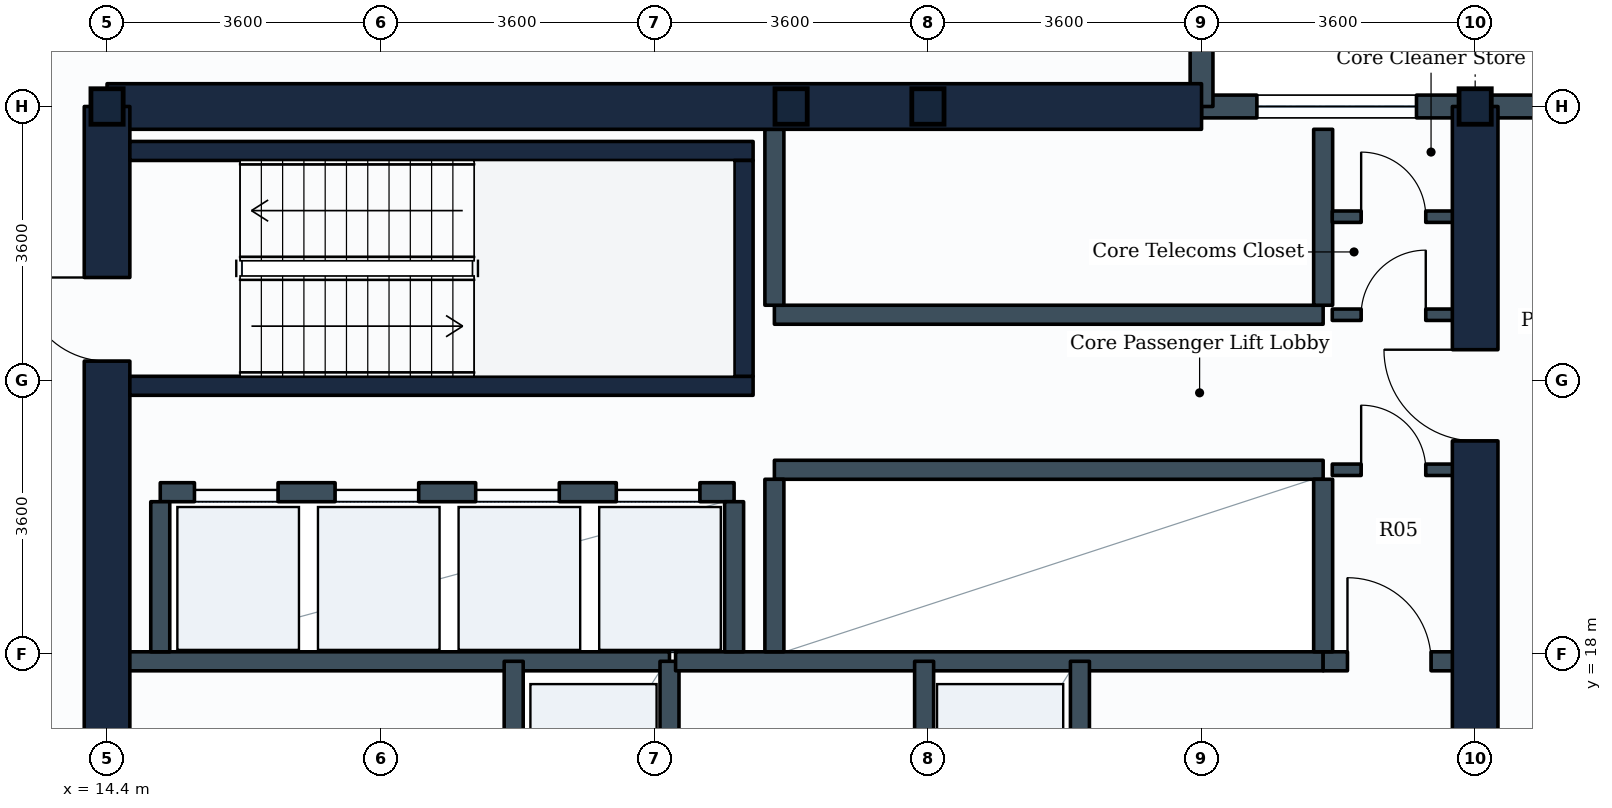
"""IFC4 building model, lengths in metres.
Left out: names, types, materials, properties, quantities, classifications, styles, units other than length and angle.
Written with IfcOpenShell. Run it as: python <this file> out.ifc"""

import sys

from ifc_helpers import new_model, si_unit, direction, frame, frame_2d, origin, origin_2d, place, context, subcontext, project, spatial, rectangle, i_section, extrude, element, fill, save


model = new_model("IFC4")
c1 = context("Model", 3, precision=1e-05, world=origin(), true_north=direction((0.0, 1.0)))
c2 = subcontext(c1, "Body", "Model", "MODEL_VIEW")
j1 = project(units=[si_unit("LENGTHUNIT", "METRE"), si_unit("PLANEANGLEUNIT", "RADIAN")], contexts=[c1])
p1 = place(None, origin())
s1 = spatial("IfcSite", under=j1, at=p1, CompositionType="ELEMENT")
p2 = place(p1, origin())
s2 = spatial("IfcBuilding", under=s1, at=p2, CompositionType="ELEMENT")
p3 = place(p2, frame((0.0, 0.0, 51.3)))
s3 = spatial("IfcBuildingStorey", under=s2, at=p3, CompositionType="ELEMENT", Elevation=51.3)
for number, where, z_axis, x_axis in (
    (1, (14.4, 25.2, 0.0), (0.0, 0.0, 1.0), (1.0, 0.0, 0.0)),
    (2, (23.4, 25.2, 0.0), (0.0, 0.0, 1.0), (1.0, 0.0, 0.0)),
    (3, (25.2, 25.2, 0.0), (0.0, 0.0, 1.0), (1.0, 0.0, 0.0)),
    (4, (32.4, 25.2, 0.0), (0.0, 0.0, 1.0), (1.0, 0.0, 0.0)),
):
    element("IfcColumn", number, at=place(p3, frame(where, z_axis=z_axis, x_axis=x_axis)), inside=s3, PredefinedType="COLUMN", context=c2, shape_type="SweptSolid", body=[
        extrude(i_section(OverallWidth=0.424, OverallDepth=0.467, WebThickness=0.033, FlangeThickness=0.053, FilletRadius=0.015, at=origin_2d()), origin(), (0.0, 0.0, 1.0), 3.9),
    ])
p4 = place(p3, frame((32.4, 25.2, 0.0), z_axis=(0.0, 0.0, 1.0), x_axis=(1.0, 0.0, 0.0)))
e5 = element("IfcWall", 5, at=p4, inside=s3, PredefinedType="STANDARD", context=c2, shape_type="SweptSolid", body=[
    extrude(rectangle(XDim=3.6, YDim=0.3, at=frame_2d((1.8, 0.0))), origin(), (0.0, 0.0, 1.0), 2.93),
])
p5 = place(p3, frame((28.8, 25.2, 0.0), z_axis=(0.0, 0.0, 1.0), x_axis=(1.0, 0.0, 0.0)))
e6 = element("IfcWall", 6, at=p5, inside=s3, PredefinedType="STANDARD", context=c2, shape_type="SweptSolid", body=[
    extrude(rectangle(XDim=3.6, YDim=0.3, at=frame_2d((1.8, 0.0))), origin(), (0.0, 0.0, 1.0), 3.635),
])
p6 = place(p5, frame((0.728, 0.0, 0.85)))
e7 = element("IfcOpeningElement", 7, at=p6, cuts=e6, PredefinedType="OPENING", context=c2, shape_type="SweptSolid", body=[
    extrude(rectangle(XDim=2.1, YDim=1.35, at=frame_2d((1.05, 0.675))), frame((0.0, 0.16, 0.0), z_axis=(0.0, -1.0, 0.0), x_axis=(1.0, 0.0, 0.0)), (0.0, 0.0, 1.0), 0.32),
])
p7 = place(p3, frame((28.8, 25.2, 0.0), z_axis=(0.0, 0.0, 1.0), x_axis=(0.0, 1.0, 0.0)))
e8 = element("IfcWall", 8, at=p7, inside=s3, PredefinedType="STANDARD", context=c2, shape_type="SweptSolid", body=[
    extrude(rectangle(XDim=3.6, YDim=0.3, at=frame_2d((1.8, 0.0))), origin(), (0.0, 0.0, 1.0), 3.14),
])
p8 = place(p3, frame((14.4, 25.2, 0.0), z_axis=(0.0, 0.0, 1.0), x_axis=(1.0, 0.0, 0.0)))
e9 = element("IfcWall", 9, at=p8, inside=s3, PredefinedType="SHEAR", context=c2, shape_type="SweptSolid", body=[
    extrude(rectangle(XDim=14.4, YDim=0.6, at=frame_2d((7.2, 0.0))), origin(), (0.0, 0.0, 1.0), 3.65),
])
p9 = place(p3, frame((14.4, 10.8, 0.0), z_axis=(0.0, 0.0, 1.0), x_axis=(0.0, 1.0, 0.0)))
e10 = element("IfcWall", 10, at=p9, inside=s3, PredefinedType="SHEAR", context=c2, shape_type="SweptSolid", body=[
    extrude(rectangle(XDim=14.4, YDim=0.6, at=frame_2d((7.2, 0.0))), origin(), (0.0, 0.0, 1.0), 3.65),
])
p10 = place(p9, frame((11.05, 0.0, 0.0)))
e11 = element("IfcOpeningElement", 11, at=p10, cuts=e10, PredefinedType="OPENING", context=c2, shape_type="SweptSolid", body=[
    extrude(rectangle(XDim=1.1, YDim=2.1, at=frame_2d((0.55, 1.05))), frame((0.0, 0.31, 0.0), z_axis=(0.0, -1.0, 0.0), x_axis=(1.0, 0.0, 0.0)), (0.0, 0.0, 1.0), 0.62),
])
p11 = place(p9, frame((4.9, 0.0, 0.0)))
e12 = element("IfcOpeningElement", 12, at=p11, cuts=e10, PredefinedType="OPENING", context=c2, shape_type="SweptSolid", body=[
    extrude(rectangle(XDim=1.2, YDim=2.1, at=frame_2d((0.6, 1.05))), frame((0.0, 0.31, 0.0), z_axis=(0.0, -1.0, 0.0), x_axis=(1.0, 0.0, 0.0)), (0.0, 0.0, 1.0), 0.62),
])
p12 = place(p3, frame((32.4, 10.8, 0.0), z_axis=(0.0, 0.0, 1.0), x_axis=(0.0, 1.0, 0.0)))
e13 = element("IfcWall", 13, at=p12, inside=s3, PredefinedType="SHEAR", context=c2, shape_type="SweptSolid", body=[
    extrude(rectangle(XDim=14.4, YDim=0.6, at=frame_2d((7.2, 0.0))), origin(), (0.0, 0.0, 1.0), 3.65),
])
p13 = place(p12, frame((4.35, 0.0, 0.0)))
e14 = element("IfcOpeningElement", 14, at=p13, cuts=e13, PredefinedType="OPENING", context=c2, shape_type="SweptSolid", body=[
    extrude(rectangle(XDim=1.2, YDim=2.1, at=frame_2d((0.6, 1.05))), frame((0.0, 0.31, 0.0), z_axis=(0.0, -1.0, 0.0), x_axis=(1.0, 0.0, 0.0)), (0.0, 0.0, 1.0), 0.62),
])
p14 = place(p12, frame((10.0, 0.0, 0.0)))
e15 = element("IfcOpeningElement", 15, at=p14, cuts=e13, PredefinedType="OPENING", context=c2, shape_type="SweptSolid", body=[
    extrude(rectangle(XDim=1.2, YDim=2.1, at=frame_2d((0.6, 1.05))), frame((0.0, 0.31, 0.0), z_axis=(0.0, -1.0, 0.0), x_axis=(1.0, 0.0, 0.0)), (0.0, 0.0, 1.0), 0.62),
])
for number, where, z_axis, x_axis in (
    (16, (14.7, 21.525, 0.0), (0.0, 0.0, 1.0), (1.0, 0.0, 0.0)),
    (17, (14.7, 24.615, 0.0), (0.0, 0.0, 1.0), (1.0, 0.0, 0.0)),
):
    element("IfcWall", number, at=place(p3, frame(where, z_axis=z_axis, x_axis=x_axis)), inside=s3, PredefinedType="SHEAR", context=c2, shape_type="SweptSolid", body=[
        extrude(rectangle(XDim=8.2, YDim=0.25, at=frame_2d((4.1, 0.0))), origin(), (0.0, 0.0, 1.0), 3.65),
    ])
p15 = place(p3, frame((22.775, 21.65, 0.0), z_axis=(0.0, 0.0, 1.0), x_axis=(0.0, 1.0, 0.0)))
e18 = element("IfcWall", 18, at=p15, inside=s3, PredefinedType="SHEAR", context=c2, shape_type="SweptSolid", body=[
    extrude(rectangle(XDim=2.84, YDim=0.25, at=frame_2d((1.42, 0.0))), origin(), (0.0, 0.0, 1.0), 3.65),
])
p16 = place(p3, frame((14.65, 17.9, 0.0), z_axis=(0.0, 0.0, 1.0), x_axis=(1.0, 0.0, 0.0)))
e19 = element("IfcWall", 19, at=p16, inside=s3, PredefinedType="PARTITIONING", context=c2, shape_type="SweptSolid", body=[
    extrude(rectangle(XDim=7.15, YDim=0.25, at=frame_2d((3.575, 0.0))), origin(), (0.0, 0.0, 1.0), 3.635),
])
p17 = place(p3, frame((19.75, 14.84, 0.0), z_axis=(0.0, 0.0, 1.0), x_axis=(0.0, 1.0, 0.0)))
e20 = element("IfcWall", 20, at=p17, inside=s3, PredefinedType="PARTITIONING", context=c2, shape_type="SweptSolid", body=[
    extrude(rectangle(XDim=3.06, YDim=0.25, at=frame_2d((1.53, 0.0))), origin(), (0.0, 0.0, 1.0), 3.635),
])
p18 = place(p17, frame((0.98, 0.0, 0.0)))
e21 = element("IfcOpeningElement", 21, at=p18, cuts=e20, PredefinedType="OPENING", context=c2, shape_type="SweptSolid", body=[
    extrude(rectangle(XDim=1.1, YDim=2.1, at=frame_2d((0.55, 1.05))), frame((0.0, 0.135, 0.0), z_axis=(0.0, -1.0, 0.0), x_axis=(1.0, 0.0, 0.0)), (0.0, 0.0, 1.0), 0.27),
])
p19 = place(p3, frame((21.8, 14.84, 0.0), z_axis=(0.0, 0.0, 1.0), x_axis=(0.0, 1.0, 0.0)))
e22 = element("IfcWall", 22, at=p19, inside=s3, PredefinedType="PARTITIONING", context=c2, shape_type="SweptSolid", body=[
    extrude(rectangle(XDim=3.06, YDim=0.25, at=frame_2d((1.53, 0.0))), origin(), (0.0, 0.0, 1.0), 3.635),
])
p20 = place(p3, frame((21.88, 17.9, 0.0), z_axis=(0.0, 0.0, 1.0), x_axis=(1.0, 0.0, 0.0)))
e23 = element("IfcWall", 23, at=p20, inside=s3, PredefinedType="PARTITIONING", context=c2, shape_type="SweptSolid", body=[
    extrude(rectangle(XDim=8.52, YDim=0.25, at=frame_2d((4.26, 0.0))), origin(), (0.0, 0.0, 1.0), 3.635),
])
p21 = place(p3, frame((30.4, 17.9, 0.0), z_axis=(0.0, 0.0, 1.0), x_axis=(1.0, 0.0, 0.0)))
e24 = element("IfcWall", 24, at=p21, inside=s3, PredefinedType="PARTITIONING", context=c2, shape_type="SweptSolid", body=[
    extrude(rectangle(XDim=1.75, YDim=0.25, at=frame_2d((0.875, 0.0))), origin(), (0.0, 0.0, 1.0), 3.635),
])
p22 = place(p21, frame((0.32, 0.0, 0.0)))
e25 = element("IfcOpeningElement", 25, at=p22, cuts=e24, PredefinedType="OPENING", context=c2, shape_type="SweptSolid", body=[
    extrude(rectangle(XDim=1.1, YDim=2.1, at=frame_2d((0.55, 1.05))), frame((0.0, 0.135, 0.0), z_axis=(0.0, -1.0, 0.0), x_axis=(1.0, 0.0, 0.0)), (0.0, 0.0, 1.0), 0.27),
])
p23 = place(p3, frame((25.15, 14.84, 0.0), z_axis=(0.0, 0.0, 1.0), x_axis=(0.0, 1.0, 0.0)))
e26 = element("IfcWall", 26, at=p23, inside=s3, PredefinedType="PARTITIONING", context=c2, shape_type="SweptSolid", body=[
    extrude(rectangle(XDim=3.06, YDim=0.25, at=frame_2d((1.53, 0.0))), origin(), (0.0, 0.0, 1.0), 3.635),
])
p24 = place(p3, frame((27.2, 14.84, 0.0), z_axis=(0.0, 0.0, 1.0), x_axis=(0.0, 1.0, 0.0)))
e27 = element("IfcWall", 27, at=p24, inside=s3, PredefinedType="PARTITIONING", context=c2, shape_type="SweptSolid", body=[
    extrude(rectangle(XDim=3.06, YDim=0.25, at=frame_2d((1.53, 0.0))), origin(), (0.0, 0.0, 1.0), 3.635),
])
p25 = place(p24, frame((0.98, 0.0, 0.0)))
e28 = element("IfcOpeningElement", 28, at=p25, cuts=e27, PredefinedType="OPENING", context=c2, shape_type="SweptSolid", body=[
    extrude(rectangle(XDim=1.1, YDim=2.1, at=frame_2d((0.55, 1.05))), frame((0.0, 0.135, 0.0), z_axis=(0.0, -1.0, 0.0), x_axis=(1.0, 0.0, 0.0)), (0.0, 0.0, 1.0), 0.27),
])
p26 = place(p3, frame((15.1, 20.125, 0.0), z_axis=(0.0, 0.0, 1.0), x_axis=(1.0, 0.0, 0.0)))
e29 = element("IfcWall", 29, at=p26, inside=s3, PredefinedType="PARTITIONING", context=c2, shape_type="SweptSolid", body=[
    extrude(rectangle(XDim=7.55, YDim=0.25, at=frame_2d((3.775, 0.0))), origin(), (0.0, 0.0, 1.0), 3.635),
])
p27 = place(p26, frame((0.45, 0.0, 0.0)))
e30 = element("IfcOpeningElement", 30, at=p27, cuts=e29, PredefinedType="OPENING", context=c2, shape_type="SweptSolid", body=[
    extrude(rectangle(XDim=1.1, YDim=2.1, at=frame_2d((0.55, 1.05))), frame((0.0, 0.135, 0.0), z_axis=(0.0, -1.0, 0.0), x_axis=(1.0, 0.0, 0.0)), (0.0, 0.0, 1.0), 0.27),
])
p28 = place(p26, frame((2.3, 0.0, 0.0)))
e31 = element("IfcOpeningElement", 31, at=p28, cuts=e29, PredefinedType="OPENING", context=c2, shape_type="SweptSolid", body=[
    extrude(rectangle(XDim=1.1, YDim=2.1, at=frame_2d((0.55, 1.05))), frame((0.0, 0.135, 0.0), z_axis=(0.0, -1.0, 0.0), x_axis=(1.0, 0.0, 0.0)), (0.0, 0.0, 1.0), 0.27),
])
p29 = place(p26, frame((4.15, 0.0, 0.0)))
e32 = element("IfcOpeningElement", 32, at=p29, cuts=e29, PredefinedType="OPENING", context=c2, shape_type="SweptSolid", body=[
    extrude(rectangle(XDim=1.1, YDim=2.1, at=frame_2d((0.55, 1.05))), frame((0.0, 0.135, 0.0), z_axis=(0.0, -1.0, 0.0), x_axis=(1.0, 0.0, 0.0)), (0.0, 0.0, 1.0), 0.27),
])
p30 = place(p26, frame((6.0, 0.0, 0.0)))
e33 = element("IfcOpeningElement", 33, at=p30, cuts=e29, PredefinedType="OPENING", context=c2, shape_type="SweptSolid", body=[
    extrude(rectangle(XDim=1.1, YDim=2.1, at=frame_2d((0.55, 1.05))), frame((0.0, 0.135, 0.0), z_axis=(0.0, -1.0, 0.0), x_axis=(1.0, 0.0, 0.0)), (0.0, 0.0, 1.0), 0.27),
])
for number, where, z_axis, x_axis in (
    (34, (15.1, 18.025, 0.0), (0.0, 0.0, 1.0), (0.0, 1.0, 0.0)),
    (35, (22.65, 18.025, 0.0), (0.0, 0.0, 1.0), (0.0, 1.0, 0.0)),
):
    element("IfcWall", number, at=place(p3, frame(where, z_axis=z_axis, x_axis=x_axis)), inside=s3, PredefinedType="PARTITIONING", context=c2, shape_type="SweptSolid", body=[
        extrude(rectangle(XDim=1.975, YDim=0.25, at=frame_2d((0.988, 0.0))), origin(), (0.0, 0.0, 1.0), 3.635),
    ])
p31 = place(p3, frame((23.18, 20.42, 0.0), z_axis=(0.0, 0.0, 1.0), x_axis=(1.0, 0.0, 0.0)))
e36 = element("IfcWall", 36, at=p31, inside=s3, PredefinedType="PARTITIONING", context=c2, shape_type="SweptSolid", body=[
    extrude(rectangle(XDim=7.22, YDim=0.25, at=frame_2d((3.61, 0.0))), origin(), (0.0, 0.0, 1.0), 3.635),
])
for number, where, z_axis, x_axis in (
    (37, (23.18, 18.025, 0.0), (0.0, 0.0, 1.0), (0.0, 1.0, 0.0)),
    (38, (30.4, 18.025, 0.0), (0.0, 0.0, 1.0), (0.0, 1.0, 0.0)),
):
    element("IfcWall", number, at=place(p3, frame(where, z_axis=z_axis, x_axis=x_axis)), inside=s3, PredefinedType="PARTITIONING", context=c2, shape_type="SweptSolid", body=[
        extrude(rectangle(XDim=2.27, YDim=0.25, at=frame_2d((1.135, 0.0))), origin(), (0.0, 0.0, 1.0), 3.635),
    ])
p32 = place(p3, frame((23.18, 22.46, 0.0), z_axis=(0.0, 0.0, 1.0), x_axis=(1.0, 0.0, 0.0)))
e39 = element("IfcWall", 39, at=p32, inside=s3, PredefinedType="PARTITIONING", context=c2, shape_type="SweptSolid", body=[
    extrude(rectangle(XDim=7.22, YDim=0.25, at=frame_2d((3.61, 0.0))), origin(), (0.0, 0.0, 1.0), 3.635),
])
for number, where, z_axis, x_axis in (
    (40, (23.18, 22.585, 0.0), (0.0, 0.0, 1.0), (0.0, 1.0, 0.0)),
    (41, (30.4, 22.585, 0.0), (0.0, 0.0, 1.0), (0.0, 1.0, 0.0)),
):
    element("IfcWall", number, at=place(p3, frame(where, z_axis=z_axis, x_axis=x_axis)), inside=s3, PredefinedType="PARTITIONING", context=c2, shape_type="SweptSolid", body=[
        extrude(rectangle(XDim=2.315, YDim=0.25, at=frame_2d((1.157, 0.0))), origin(), (0.0, 0.0, 1.0), 3.635),
    ])
p33 = place(p3, frame((30.52, 22.46, 0.0), z_axis=(0.0, 0.0, 1.0), x_axis=(1.0, 0.0, 0.0)))
e42 = element("IfcWall", 42, at=p33, inside=s3, PredefinedType="PARTITIONING", context=c2, shape_type="SweptSolid", body=[
    extrude(rectangle(XDim=1.63, YDim=0.15, at=frame_2d((0.815, 0.0))), origin(), (0.0, 0.0, 1.0), 3.635),
])
p34 = place(p33, frame((0.38, 0.0, 0.0)))
e43 = element("IfcOpeningElement", 43, at=p34, cuts=e42, PredefinedType="OPENING", context=c2, shape_type="SweptSolid", body=[
    extrude(rectangle(XDim=0.85, YDim=2.1, at=frame_2d((0.425, 1.05))), frame((0.0, 0.085, 0.0), z_axis=(0.0, -1.0, 0.0), x_axis=(1.0, 0.0, 0.0)), (0.0, 0.0, 1.0), 0.17),
])
p35 = place(p3, frame((30.52, 23.75, 0.0), z_axis=(0.0, 0.0, 1.0), x_axis=(1.0, 0.0, 0.0)))
e44 = element("IfcWall", 44, at=p35, inside=s3, PredefinedType="PARTITIONING", context=c2, shape_type="SweptSolid", body=[
    extrude(rectangle(XDim=1.63, YDim=0.15, at=frame_2d((0.815, 0.0))), origin(), (0.0, 0.0, 1.0), 3.635),
])
p36 = place(p35, frame((0.38, 0.0, 0.0)))
e45 = element("IfcOpeningElement", 45, at=p36, cuts=e44, PredefinedType="OPENING", context=c2, shape_type="SweptSolid", body=[
    extrude(rectangle(XDim=0.85, YDim=2.1, at=frame_2d((0.425, 1.05))), frame((0.0, 0.085, 0.0), z_axis=(0.0, -1.0, 0.0), x_axis=(1.0, 0.0, 0.0)), (0.0, 0.0, 1.0), 0.17),
])
p37 = place(p3, frame((30.52, 20.42, 0.0), z_axis=(0.0, 0.0, 1.0), x_axis=(1.0, 0.0, 0.0)))
e46 = element("IfcWall", 46, at=p37, inside=s3, PredefinedType="PARTITIONING", context=c2, shape_type="SweptSolid", body=[
    extrude(rectangle(XDim=1.63, YDim=0.15, at=frame_2d((0.815, 0.0))), origin(), (0.0, 0.0, 1.0), 3.635),
])
p38 = place(p37, frame((0.38, 0.0, 0.0)))
e47 = element("IfcOpeningElement", 47, at=p38, cuts=e46, PredefinedType="OPENING", context=c2, shape_type="SweptSolid", body=[
    extrude(rectangle(XDim=0.85, YDim=2.1, at=frame_2d((0.425, 1.05))), frame((0.0, 0.085, 0.0), z_axis=(0.0, -1.0, 0.0), x_axis=(1.0, 0.0, 0.0)), (0.0, 0.0, 1.0), 0.17),
])
p39 = place(p6, origin())
e48 = element("IfcWindow", 48, at=p39, inside=s3, PartitioningType="SINGLE_PANEL", PredefinedType="WINDOW", context=c2, shape_type="SweptSolid", body=[
    extrude(rectangle(XDim=2.1, YDim=1.35, at=frame_2d((1.05, 0.675))), frame((0.0, 0.03, 0.0), z_axis=(0.0, -1.0, 0.0), x_axis=(1.0, 0.0, 0.0)), (0.0, 0.0, 1.0), 0.06),
])
fill(e7, e48)
p40 = place(p10, origin())
e49 = element("IfcDoor", 49, at=p40, inside=s3, OperationType="SINGLE_SWING_RIGHT", PredefinedType="DOOR", context=c2, shape_type="SweptSolid", body=[
    extrude(rectangle(XDim=1.1, YDim=2.1, at=frame_2d((0.55, 1.05))), frame((0.0, 0.025, 0.0), z_axis=(0.0, -1.0, 0.0), x_axis=(1.0, 0.0, 0.0)), (0.0, 0.0, 1.0), 0.05),
])
fill(e11, e49)
p41 = place(p22, origin())
e50 = element("IfcDoor", 50, at=p41, inside=s3, OperationType="SINGLE_SWING_LEFT", PredefinedType="DOOR", context=c2, shape_type="SweptSolid", body=[
    extrude(rectangle(XDim=1.1, YDim=2.1, at=frame_2d((0.55, 1.05))), frame((0.0, 0.025, 0.0), z_axis=(0.0, -1.0, 0.0), x_axis=(1.0, 0.0, 0.0)), (0.0, 0.0, 1.0), 0.05),
])
fill(e25, e50)
p42 = place(p27, origin())
e51 = element("IfcDoor", 51, at=p42, inside=s3, OperationType="SLIDING_TO_LEFT", PredefinedType="DOOR", context=c2, shape_type="SweptSolid", body=[
    extrude(rectangle(XDim=1.1, YDim=2.1, at=frame_2d((0.55, 1.05))), frame((0.0, 0.025, 0.0), z_axis=(0.0, -1.0, 0.0), x_axis=(1.0, 0.0, 0.0)), (0.0, 0.0, 1.0), 0.05),
])
fill(e30, e51)
p43 = place(p28, origin())
e52 = element("IfcDoor", 52, at=p43, inside=s3, OperationType="SLIDING_TO_LEFT", PredefinedType="DOOR", context=c2, shape_type="SweptSolid", body=[
    extrude(rectangle(XDim=1.1, YDim=2.1, at=frame_2d((0.55, 1.05))), frame((0.0, 0.025, 0.0), z_axis=(0.0, -1.0, 0.0), x_axis=(1.0, 0.0, 0.0)), (0.0, 0.0, 1.0), 0.05),
])
fill(e31, e52)
p44 = place(p29, origin())
e53 = element("IfcDoor", 53, at=p44, inside=s3, OperationType="SLIDING_TO_LEFT", PredefinedType="DOOR", context=c2, shape_type="SweptSolid", body=[
    extrude(rectangle(XDim=1.1, YDim=2.1, at=frame_2d((0.55, 1.05))), frame((0.0, 0.025, 0.0), z_axis=(0.0, -1.0, 0.0), x_axis=(1.0, 0.0, 0.0)), (0.0, 0.0, 1.0), 0.05),
])
fill(e32, e53)
p45 = place(p30, origin())
e54 = element("IfcDoor", 54, at=p45, inside=s3, OperationType="SLIDING_TO_LEFT", PredefinedType="DOOR", context=c2, shape_type="SweptSolid", body=[
    extrude(rectangle(XDim=1.1, YDim=2.1, at=frame_2d((0.55, 1.05))), frame((0.0, 0.025, 0.0), z_axis=(0.0, -1.0, 0.0), x_axis=(1.0, 0.0, 0.0)), (0.0, 0.0, 1.0), 0.05),
])
fill(e33, e54)
p46 = place(p14, origin())
e55 = element("IfcDoor", 55, at=p46, inside=s3, OperationType="SINGLE_SWING_RIGHT", PredefinedType="DOOR", context=c2, shape_type="SweptSolid", body=[
    extrude(rectangle(XDim=1.2, YDim=2.1, at=frame_2d((0.6, 1.05))), frame((0.0, 0.025, 0.0), z_axis=(0.0, -1.0, 0.0), x_axis=(1.0, 0.0, 0.0)), (0.0, 0.0, 1.0), 0.05),
])
fill(e15, e55)
p47 = place(p34, origin())
e56 = element("IfcDoor", 56, at=p47, inside=s3, OperationType="SINGLE_SWING_RIGHT", PredefinedType="DOOR", context=c2, shape_type="SweptSolid", body=[
    extrude(rectangle(XDim=0.85, YDim=2.1, at=frame_2d((0.425, 1.05))), frame((0.0, 0.025, 0.0), z_axis=(0.0, -1.0, 0.0), x_axis=(1.0, 0.0, 0.0)), (0.0, 0.0, 1.0), 0.05),
])
fill(e43, e56)
p48 = place(p36, origin())
e57 = element("IfcDoor", 57, at=p48, inside=s3, OperationType="SINGLE_SWING_LEFT", PredefinedType="DOOR", context=c2, shape_type="SweptSolid", body=[
    extrude(rectangle(XDim=0.85, YDim=2.1, at=frame_2d((0.425, 1.05))), frame((0.0, 0.025, 0.0), z_axis=(0.0, -1.0, 0.0), x_axis=(1.0, 0.0, 0.0)), (0.0, 0.0, 1.0), 0.05),
])
fill(e45, e57)
p49 = place(p38, origin())
e58 = element("IfcDoor", 58, at=p49, inside=s3, OperationType="SINGLE_SWING_LEFT", PredefinedType="DOOR", context=c2, shape_type="SweptSolid", body=[
    extrude(rectangle(XDim=0.85, YDim=2.1, at=frame_2d((0.425, 1.05))), frame((0.0, 0.025, 0.0), z_axis=(0.0, -1.0, 0.0), x_axis=(1.0, 0.0, 0.0)), (0.0, 0.0, 1.0), 0.05),
])
fill(e47, e58)
save(model, sys.argv[1])
